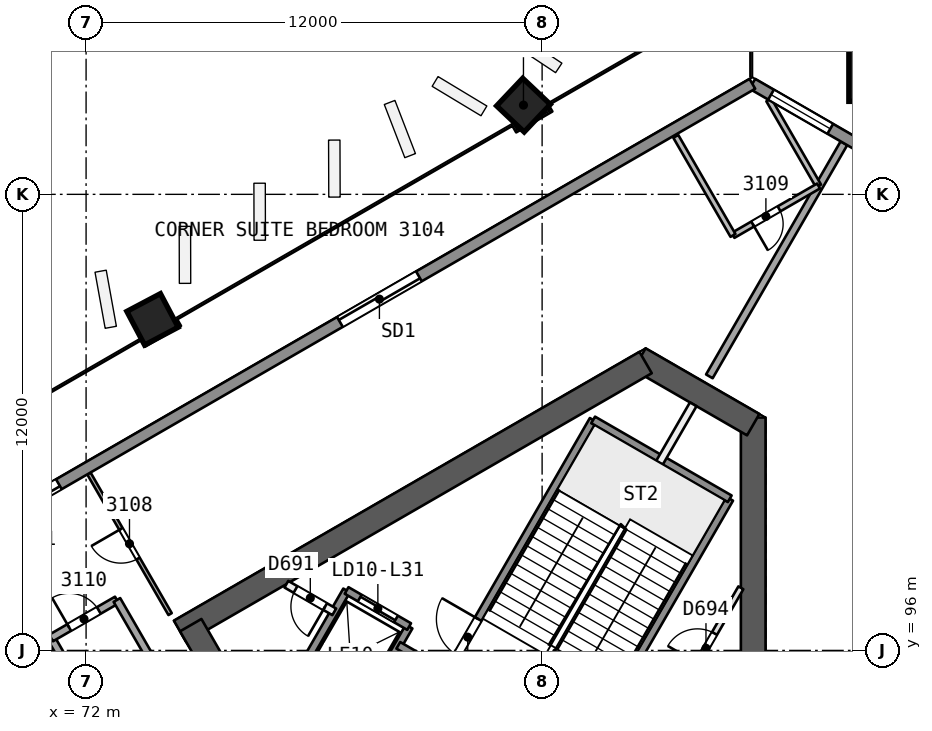
"""IFC4 building model, lengths in metres.
Left out: names, types, materials, properties, quantities, classifications, styles, units other than length and angle.
Written with IfcOpenShell. Run it as: python <this file> out.ifc"""

import sys

from ifc_helpers import new_model, si_unit, direction, frame, frame_2d, origin, origin_2d, place, context, subcontext, project, spatial, rectangle, extrude, element, fill, save


model = new_model("IFC4")
c1 = context("Model", 3, precision=1e-05, world=origin(), true_north=direction((0.0, 1.0)))
c2 = subcontext(c1, "Body", "Model", "MODEL_VIEW")
j1 = project(units=[si_unit("LENGTHUNIT", "METRE"), si_unit("PLANEANGLEUNIT", "RADIAN")], contexts=[c1])
p1 = place(None, origin())
s1 = spatial("IfcSite", under=j1, at=p1, CompositionType="ELEMENT")
p2 = place(p1, origin())
s2 = spatial("IfcBuilding", under=s1, at=p2, CompositionType="ELEMENT")
p3 = place(p2, frame((0.0, 0.0, 129.0)))
s3 = spatial("IfcBuildingStorey", under=s2, at=p3, CompositionType="ELEMENT", Elevation=129.0)
p4 = place(p3, frame((89.555, 88.119, 0.0), z_axis=(0.0, 0.0, 1.0), x_axis=(0.0, 1.0, 0.0)))
e1 = element("IfcWall", 1, at=p4, inside=s3, PredefinedType="SHEAR", context=c2, shape_type="SweptSolid", body=[
    extrude(rectangle(XDim=14.009, YDim=0.65, at=frame_2d((7.004, 0.0))), origin(), (0.0, 0.0, 1.0), 3.7),
])
p5 = place(p3, frame((89.555, 101.94, 0.0), z_axis=(0.0, 0.0, 1.0), x_axis=(-0.866031550877, 0.499989352773, 0.0)))
e2 = element("IfcWall", 2, at=p5, inside=s3, PredefinedType="SHEAR", context=c2, shape_type="SweptSolid", body=[
    extrude(rectangle(XDim=3.458, YDim=0.65, at=frame_2d((1.729, 0.0))), origin(), (0.0, 0.0, 1.0), 3.7),
])
p6 = place(p3, frame((86.723, 103.575, 0.0), z_axis=(0.0, 0.0, 1.0), x_axis=(-0.866031824457, -0.499988878904, 0.0)))
e3 = element("IfcWall", 3, at=p6, inside=s3, PredefinedType="SHEAR", context=c2, shape_type="SweptSolid", body=[
    extrude(rectangle(XDim=14.146, YDim=0.65, at=frame_2d((7.073, 0.0))), origin(), (0.0, 0.0, 1.0), 3.7),
])
p7 = place(p3, frame((74.754, 96.665, 0.0), z_axis=(0.0, 0.0, 1.0), x_axis=(0.500011799426, -0.866018591275, 0.0)))
e4 = element("IfcWall", 4, at=p7, inside=s3, PredefinedType="SHEAR", context=c2, shape_type="SweptSolid", body=[
    extrude(rectangle(XDim=10.055, YDim=0.65, at=frame_2d((5.027, 0.0))), origin(), (0.0, 0.0, 1.0), 3.7),
])
p8 = place(p7, frame((7.905, 0.0, 0.0)))
e5 = element("IfcOpeningElement", 5, at=p8, cuts=e4, PredefinedType="OPENING", context=c2, shape_type="SweptSolid", body=[
    extrude(rectangle(XDim=1.2, YDim=2.1, at=frame_2d((0.6, 1.05))), frame((0.0, 0.335, 0.0), z_axis=(0.0, -1.0, 0.0), x_axis=(1.0, 0.0, 0.0)), (0.0, 0.0, 1.0), 0.671),
])
p9 = place(p3, frame((93.292, 111.682, 0.0), z_axis=(-0.017607037296, -0.030466109479, 0.999380712447), x_axis=(0.865812389079, -0.500368770925, 1.01334e-07)))
e6 = element("IfcColumn", 6, at=p9, inside=s3, PredefinedType="COLUMN", context=c2, shape_type="SweptSolid", body=[
    extrude(rectangle(XDim=2.4, YDim=2.4, at=origin_2d()), origin(), (0.0, 0.0, 1.0), 3.702),
])
p10 = place(p3, frame((83.519, 110.381, 0.0), z_axis=(-0.008376454378, -0.028163354484, 0.999568237028), x_axis=(0.865853490665, 0.499842344986, 0.021339232902)))
e7 = element("IfcColumn", 7, at=p10, inside=s3, PredefinedType="COLUMN", context=c2, shape_type="SweptSolid", body=[
    extrude(rectangle(XDim=1.0, YDim=1.0, at=origin_2d()), origin(), (0.0, 0.0, 1.0), 3.702),
])
p11 = place(p3, frame((73.747, 104.739, 0.0), z_axis=(0.000857580205, -0.022758859284, 0.9997406158), x_axis=(0.865999914472, 0.499930977311, 0.010637953697)))
e8 = element("IfcColumn", 8, at=p11, inside=s3, PredefinedType="COLUMN", context=c2, shape_type="SweptSolid", body=[
    extrude(rectangle(XDim=1.0, YDim=1.0, at=origin_2d()), origin(), (0.0, 0.0, 1.0), 3.701),
])
p12 = place(p3, frame((91.942, 109.345, 0.0), z_axis=(0.0, 0.0, 1.0), x_axis=(-0.499980071345, -0.866036909293, 0.0)))
e9 = element("IfcWall", 9, at=p12, inside=s3, PredefinedType="PARTITIONING", context=c2, shape_type="SweptSolid", body=[
    extrude(rectangle(XDim=7.082, YDim=0.2, at=frame_2d((3.541, 0.0))), origin(), (0.0, 0.0, 1.0), 3.25),
])
p13 = place(p3, frame((74.21, 96.956, 0.0), z_axis=(0.0, 0.0, 1.0), x_axis=(-0.49995489152, 0.866051445611, 0.0)))
e10 = element("IfcWall", 10, at=p13, inside=s3, PredefinedType="PARTITIONING", context=c2, shape_type="SweptSolid", body=[
    extrude(rectangle(XDim=4.273, YDim=0.1, at=frame_2d((2.137, 0.0))), origin(), (0.0, 0.0, 1.0), 3.25),
])
p14 = place(p13, frame((1.687, 0.0, 0.0)))
e11 = element("IfcOpeningElement", 11, at=p14, cuts=e10, PredefinedType="OPENING", context=c2, shape_type="SweptSolid", body=[
    extrude(rectangle(XDim=0.9, YDim=2.1, at=frame_2d((0.45, 1.05))), frame((0.0, 0.061, 0.0), z_axis=(0.0, -1.0, 0.0), x_axis=(1.0, 0.0, 0.0)), (0.0, 0.0, 1.0), 0.121),
])
p15 = place(p3, frame((75.579, 88.533, 0.0), z_axis=(0.0, 0.0, 1.0), x_axis=(-0.5000018851, 0.866024315419, 0.0)))
e12 = element("IfcWall", 12, at=p15, inside=s3, PredefinedType="PARTITIONING", context=c2, shape_type="SweptSolid", body=[
    extrude(rectangle(XDim=9.0, YDim=0.2, at=frame_2d((4.5, 0.0))), origin(), (0.0, 0.0, 1.0), 3.25),
])
p16 = place(p3, frame((71.079, 96.327, 0.0), z_axis=(0.0, 0.0, 1.0), x_axis=(0.866041268327, 0.499972520799, 0.0)))
e13 = element("IfcWall", 13, at=p16, inside=s3, PredefinedType="PARTITIONING", context=c2, shape_type="SweptSolid", body=[
    extrude(rectangle(XDim=2.0, YDim=0.2, at=frame_2d((1.0, 0.0))), origin(), (0.0, 0.0, 1.0), 3.25),
])
p17 = place(p16, frame((0.55, 0.0, 0.0)))
e14 = element("IfcOpeningElement", 14, at=p17, cuts=e13, PredefinedType="OPENING", context=c2, shape_type="SweptSolid", body=[
    extrude(rectangle(XDim=0.9, YDim=2.1, at=frame_2d((0.45, 1.05))), frame((0.0, 0.11, 0.0), z_axis=(0.0, -1.0, 0.0), x_axis=(1.0, 0.0, 0.0)), (0.0, 0.0, 1.0), 0.221),
])
p18 = place(p3, frame((72.811, 97.327, 0.0), z_axis=(0.0, 0.0, 1.0), x_axis=(0.5000018851, -0.866024315419, 0.0)))
e15 = element("IfcWall", 15, at=p18, inside=s3, PredefinedType="PARTITIONING", context=c2, shape_type="SweptSolid", body=[
    extrude(rectangle(XDim=9.0, YDim=0.2, at=frame_2d((4.5, 0.0))), origin(), (0.0, 0.0, 1.0), 3.25),
])
p19 = place(p3, frame((68.564, 98.63, 0.0), z_axis=(0.0, 0.0, 1.0), x_axis=(0.499988083099, -0.866032283901, 0.0)))
e16 = element("IfcWall", 16, at=p19, inside=s3, PredefinedType="PARTITIONING", context=c2, shape_type="SweptSolid", body=[
    extrude(rectangle(XDim=12.252, YDim=0.2, at=frame_2d((6.126, 0.0))), origin(), (0.0, 0.0, 1.0), 3.25),
])
p20 = place(p3, frame((89.966, 110.486, 0.0), z_axis=(0.0, 0.0, 1.0), x_axis=(0.500032006216, -0.866006924198, 0.0)))
e17 = element("IfcWall", 17, at=p20, inside=s3, PredefinedType="PARTITIONING", context=c2, shape_type="SweptSolid", body=[
    extrude(rectangle(XDim=2.617, YDim=0.15, at=frame_2d((1.309, 0.0))), origin(), (0.0, 0.0, 1.0), 3.25),
])
p21 = place(p3, frame((91.274, 108.219, 0.0), z_axis=(0.0, 0.0, 1.0), x_axis=(-0.866021400173, -0.500006934395, 0.0)))
e18 = element("IfcWall", 18, at=p21, inside=s3, PredefinedType="PARTITIONING", context=c2, shape_type="SweptSolid", body=[
    extrude(rectangle(XDim=2.6, YDim=0.15, at=frame_2d((1.3, 0.0))), origin(), (0.0, 0.0, 1.0), 3.25),
])
p22 = place(p21, frame((1.2, 0.0, 0.0)))
e19 = element("IfcOpeningElement", 19, at=p22, cuts=e18, PredefinedType="OPENING", context=c2, shape_type="SweptSolid", body=[
    extrude(rectangle(XDim=0.8, YDim=2.1, at=frame_2d((0.4, 1.05))), frame((0.0, 0.085, 0.0), z_axis=(0.0, -1.0, 0.0), x_axis=(1.0, 0.0, 0.0)), (0.0, 0.0, 1.0), 0.171),
])
p23 = place(p3, frame((89.023, 106.919, 0.0), z_axis=(0.0, 0.0, 1.0), x_axis=(-0.500012686397, 0.866018079166, 0.0)))
e20 = element("IfcWall", 20, at=p23, inside=s3, PredefinedType="PARTITIONING", context=c2, shape_type="SweptSolid", body=[
    extrude(rectangle(XDim=3.01, YDim=0.15, at=frame_2d((1.505, 0.0))), origin(), (0.0, 0.0, 1.0), 3.25),
])
p24 = place(p3, frame((89.532, 110.908, 0.0), z_axis=(0.0, 0.0, 1.0), x_axis=(0.866021903596, -0.500006062455, 0.0)))
e21 = element("IfcWall", 21, at=p24, inside=s3, PredefinedType="SOLIDWALL", context=c2, shape_type="SweptSolid", body=[
    extrude(rectangle(XDim=5.738, YDim=0.3, at=frame_2d((2.869, 0.0))), origin(), (0.0, 0.0, 1.0), 3.25),
])
p25 = place(p24, frame((0.568, 0.0, 0.9)))
e22 = element("IfcOpeningElement", 22, at=p25, cuts=e21, PredefinedType="OPENING", context=c2, shape_type="SweptSolid", body=[
    extrude(rectangle(XDim=1.8, YDim=1.5, at=frame_2d((0.9, 0.75))), frame((0.0, 0.161, 0.0), z_axis=(0.0, -1.0, 0.0), x_axis=(1.0, 0.0, 0.0)), (0.0, 0.0, 1.0), 0.321),
])
p26 = place(p24, frame((3.446, 0.0, 0.9)))
e23 = element("IfcOpeningElement", 23, at=p26, cuts=e21, PredefinedType="OPENING", context=c2, shape_type="SweptSolid", body=[
    extrude(rectangle(XDim=1.8, YDim=1.5, at=frame_2d((0.9, 0.75))), frame((0.0, 0.161, 0.0), z_axis=(0.0, -1.0, 0.0), x_axis=(1.0, 0.0, 0.0)), (0.0, 0.0, 1.0), 0.321),
])
p27 = place(p3, frame((40.967, 82.869, 0.0), z_axis=(0.0, 0.0, 1.0), x_axis=(0.86602616217, 0.499998686435, 0.0)))
e24 = element("IfcWall", 24, at=p27, inside=s3, PredefinedType="SOLIDWALL", context=c2, shape_type="SweptSolid", body=[
    extrude(rectangle(XDim=56.079, YDim=0.3, at=frame_2d((28.04, 0.0))), origin(), (0.0, 0.0, 1.0), 3.25),
])
p28 = place(p27, frame((26.839, 0.0, 0.0)))
e25 = element("IfcOpeningElement", 25, at=p28, cuts=e24, PredefinedType="OPENING", context=c2, shape_type="SweptSolid", body=[
    extrude(rectangle(XDim=2.4, YDim=2.4, at=frame_2d((1.2, 1.2))), frame((0.0, 0.161, 0.0), z_axis=(0.0, -1.0, 0.0), x_axis=(1.0, 0.0, 0.0)), (0.0, 0.0, 1.0), 0.321),
])
p29 = place(p27, frame((32.607, 0.0, 0.0)))
e26 = element("IfcOpeningElement", 26, at=p29, cuts=e24, PredefinedType="OPENING", context=c2, shape_type="SweptSolid", body=[
    extrude(rectangle(XDim=2.4, YDim=2.4, at=frame_2d((1.2, 1.2))), frame((0.0, 0.161, 0.0), z_axis=(0.0, -1.0, 0.0), x_axis=(1.0, 0.0, 0.0)), (0.0, 0.0, 1.0), 0.321),
])
p30 = place(p27, frame((43.547, 0.0, 0.0)))
e27 = element("IfcOpeningElement", 27, at=p30, cuts=e24, PredefinedType="OPENING", context=c2, shape_type="SweptSolid", body=[
    extrude(rectangle(XDim=2.4, YDim=2.4, at=frame_2d((1.2, 1.2))), frame((0.0, 0.161, 0.0), z_axis=(0.0, -1.0, 0.0), x_axis=(1.0, 0.0, 0.0)), (0.0, 0.0, 1.0), 0.321),
])
p31 = place(p27, frame((21.072, 0.0, 0.0)))
e28 = element("IfcOpeningElement", 28, at=p31, cuts=e24, PredefinedType="OPENING", context=c2, shape_type="SweptSolid", body=[
    extrude(rectangle(XDim=2.4, YDim=2.4, at=frame_2d((1.2, 1.2))), frame((0.0, 0.161, 0.0), z_axis=(0.0, -1.0, 0.0), x_axis=(1.0, 0.0, 0.0)), (0.0, 0.0, 1.0), 0.321),
])
p32 = place(p27, frame((10.136, 0.0, 0.0)))
e29 = element("IfcOpeningElement", 29, at=p32, cuts=e24, PredefinedType="OPENING", context=c2, shape_type="SweptSolid", body=[
    extrude(rectangle(XDim=2.4, YDim=2.4, at=frame_2d((1.2, 1.2))), frame((0.0, 0.161, 0.0), z_axis=(0.0, -1.0, 0.0), x_axis=(1.0, 0.0, 0.0)), (0.0, 0.0, 1.0), 0.321),
])
p33 = place(p3, frame((87.421, 94.514, 0.0), z_axis=(0.0, 0.0, 1.0), x_axis=(0.499993116331, 0.866029378036, 0.0)))
e30 = element("IfcWall", 30, at=p33, inside=s3, PredefinedType="PARTITIONING", context=c2, shape_type="SweptSolid", body=[
    extrude(rectangle(XDim=3.618, YDim=0.15, at=frame_2d((1.809, 0.0))), origin(), (0.0, 0.0, 1.0), 3.25),
])
p34 = place(p33, frame((1.332, 0.0, 0.0)))
e31 = element("IfcOpeningElement", 31, at=p34, cuts=e30, PredefinedType="OPENING", context=c2, shape_type="SweptSolid", body=[
    extrude(rectangle(XDim=0.9, YDim=2.1, at=frame_2d((0.45, 1.05))), frame((0.0, 0.085, 0.0), z_axis=(0.0, -1.0, 0.0), x_axis=(1.0, 0.0, 0.0)), (0.0, 0.0, 1.0), 0.171),
])
p35 = place(p3, frame((85.087, 93.321, 0.0), z_axis=(0.0, 0.0, 1.0), x_axis=(0.500019787375, 0.866013979237, 0.0)))
e32 = element("IfcWall", 32, at=p35, inside=s3, PredefinedType="SOLIDWALL", context=c2, shape_type="SweptSolid", body=[
    extrude(rectangle(XDim=7.7, YDim=0.2, at=frame_2d((3.85, 0.0))), origin(), (0.0, 0.0, 1.0), 3.25),
])
p36 = place(p3, frame((87.09, 100.94, 0.0), z_axis=(0.0, 0.0, 1.0), x_axis=(0.499944938281, 0.866057191349, 0.0)))
e33 = element("IfcWall", 33, at=p36, inside=s3, PredefinedType="PARTITIONING", context=c2, shape_type="SweptSolid", body=[
    extrude(rectangle(XDim=1.773, YDim=0.2, at=frame_2d((0.887, 0.0))), origin(), (0.0, 0.0, 1.0), 3.25),
])
p37 = place(p3, frame((81.493, 95.396, 0.0), z_axis=(0.0, 0.0, 1.0), x_axis=(0.500006057782, 0.866021906294, 0.0)))
e34 = element("IfcWall", 34, at=p37, inside=s3, PredefinedType="SOLIDWALL", context=c2, shape_type="SweptSolid", body=[
    extrude(rectangle(XDim=7.7, YDim=0.2, at=frame_2d((3.85, 0.0))), origin(), (0.0, 0.0, 1.0), 3.25),
])
p38 = place(p37, frame((0.55, 0.0, 0.0)))
e35 = element("IfcOpeningElement", 35, at=p38, cuts=e34, PredefinedType="OPENING", context=c2, shape_type="SweptSolid", body=[
    extrude(rectangle(XDim=1.1, YDim=2.1, at=frame_2d((0.55, 1.05))), frame((0.0, 0.11, 0.0), z_axis=(0.0, -1.0, 0.0), x_axis=(1.0, 0.0, 0.0)), (0.0, 0.0, 1.0), 0.221),
])
for number, where, z_axis, x_axis in (
    (36, (78.976, 93.986, 0.0), (0.0, 0.0, 1.0), (0.5, 0.866, 0.0)),
    (37, (77.33, 94.936, 0.0), (0.0, 0.0, 1.0), (0.5, 0.866, 0.0)),
):
    element("IfcWall", number, at=place(p3, frame(where, z_axis=z_axis, x_axis=x_axis)), inside=s3, PredefinedType="SOLIDWALL", context=c2, shape_type="SweptSolid", body=[
        extrude(rectangle(XDim=3.05, YDim=0.2, at=frame_2d((1.525, 0.0))), origin(), (0.0, 0.0, 1.0), 3.25),
    ])
p39 = place(p3, frame((78.53, 97.014, 0.0), z_axis=(0.0, 0.0, 1.0), x_axis=(-0.866045896294, 0.499964504253, 0.0)))
e38 = element("IfcWall", 38, at=p39, inside=s3, PredefinedType="PARTITIONING", context=c2, shape_type="SweptSolid", body=[
    extrude(rectangle(XDim=1.455, YDim=0.2, at=frame_2d((0.728, 0.0))), origin(), (0.0, 0.0, 1.0), 3.25),
])
p40 = place(p39, frame((0.278, 0.0, 0.0)))
e39 = element("IfcOpeningElement", 39, at=p40, cuts=e38, PredefinedType="OPENING", context=c2, shape_type="SweptSolid", body=[
    extrude(rectangle(XDim=0.9, YDim=2.1, at=frame_2d((0.45, 1.05))), frame((0.0, 0.11, 0.0), z_axis=(0.0, -1.0, 0.0), x_axis=(1.0, 0.0, 0.0)), (0.0, 0.0, 1.0), 0.221),
])
p41 = place(p3, frame((88.01, 91.634, 0.0), z_axis=(0.0, 0.0, 1.0), x_axis=(-0.866024315419, 0.5000018851, 0.0)))
e40 = element("IfcWall", 40, at=p41, inside=s3, PredefinedType="SOLIDWALL", context=c2, shape_type="SweptSolid", body=[
    extrude(rectangle(XDim=9.0, YDim=0.2, at=frame_2d((4.5, 0.0))), origin(), (0.0, 0.0, 1.0), 3.25),
])
p42 = place(p3, frame((80.5, 96.627, 0.0), z_axis=(0.0, 0.0, 1.0), x_axis=(-0.86601224135, 0.500022797313, 0.0)))
e41 = element("IfcWall", 41, at=p42, inside=s3, PredefinedType="SOLIDWALL", context=c2, shape_type="SweptSolid", body=[
    extrude(rectangle(XDim=1.9, YDim=0.2, at=frame_2d((0.95, 0.0))), origin(), (0.0, 0.0, 1.0), 3.25),
])
p43 = place(p42, frame((0.4, 0.0, 0.0)))
e42 = element("IfcOpeningElement", 42, at=p43, cuts=e41, PredefinedType="OPENING", context=c2, shape_type="SweptSolid", body=[
    extrude(rectangle(XDim=1.1, YDim=2.1, at=frame_2d((0.55, 1.05))), frame((0.0, 0.11, 0.0), z_axis=(0.0, -1.0, 0.0), x_axis=(1.0, 0.0, 0.0)), (0.0, 0.0, 1.0), 0.221),
])
p44 = place(p3, frame((88.937, 99.99, 0.0), z_axis=(0.0, 0.0, 1.0), x_axis=(-0.866004344652, 0.500036473714, 0.0)))
e43 = element("IfcWall", 43, at=p44, inside=s3, PredefinedType="SOLIDWALL", context=c2, shape_type="SweptSolid", body=[
    extrude(rectangle(XDim=4.15, YDim=0.2, at=frame_2d((2.075, 0.0))), origin(), (0.0, 0.0, 1.0), 3.25),
])
p45 = place(p14, origin())
e44 = element("IfcDoor", 44, at=p45, inside=s3, OperationType="SINGLE_SWING_RIGHT", PredefinedType="NOTDEFINED", context=c2, shape_type="SweptSolid", body=[
    extrude(rectangle(XDim=0.9, YDim=2.1, at=frame_2d((0.45, 1.05))), frame((0.0, 0.025, 0.0), z_axis=(0.0, -1.0, 0.0), x_axis=(1.0, 0.0, 0.0)), (0.0, 0.0, 1.0), 0.05),
])
fill(e11, e44)
p46 = place(p22, origin())
e45 = element("IfcDoor", 45, at=p46, inside=s3, OperationType="SINGLE_SWING_RIGHT", PredefinedType="NOTDEFINED", context=c2, shape_type="SweptSolid", body=[
    extrude(rectangle(XDim=0.8, YDim=2.1, at=frame_2d((0.4, 1.05))), frame((0.0, 0.025, 0.0), z_axis=(0.0, -1.0, 0.0), x_axis=(1.0, 0.0, 0.0)), (0.0, 0.0, 1.0), 0.05),
])
fill(e19, e45)
p47 = place(p17, origin())
e46 = element("IfcDoor", 46, at=p47, inside=s3, OperationType="SINGLE_SWING_LEFT", PredefinedType="NOTDEFINED", context=c2, shape_type="SweptSolid", body=[
    extrude(rectangle(XDim=0.9, YDim=2.1, at=frame_2d((0.45, 1.05))), frame((0.0, 0.025, 0.0), z_axis=(0.0, -1.0, 0.0), x_axis=(1.0, 0.0, 0.0)), (0.0, 0.0, 1.0), 0.05),
])
fill(e14, e46)
p48 = place(p25, origin())
e47 = element("IfcWindow", 47, at=p48, inside=s3, PartitioningType="SINGLE_PANEL", PredefinedType="WINDOW", context=c2, shape_type="SweptSolid", body=[
    extrude(rectangle(XDim=1.8, YDim=1.5, at=frame_2d((0.9, 0.75))), frame((0.0, 0.03, 0.0), z_axis=(0.0, -1.0, 0.0), x_axis=(1.0, 0.0, 0.0)), (0.0, 0.0, 1.0), 0.06),
])
fill(e22, e47)
p49 = place(p29, origin())
e48 = element("IfcDoor", 48, at=p49, inside=s3, OperationType="SLIDING_TO_RIGHT", PredefinedType="NOTDEFINED", context=c2, shape_type="SweptSolid", body=[
    extrude(rectangle(XDim=2.4, YDim=2.4, at=frame_2d((1.2, 1.2))), frame((0.0, 0.025, 0.0), z_axis=(0.0, -1.0, 0.0), x_axis=(1.0, 0.0, 0.0)), (0.0, 0.0, 1.0), 0.05),
])
fill(e26, e48)
p50 = place(p30, origin())
e49 = element("IfcDoor", 49, at=p50, inside=s3, OperationType="SLIDING_TO_LEFT", PredefinedType="NOTDEFINED", context=c2, shape_type="SweptSolid", body=[
    extrude(rectangle(XDim=2.4, YDim=2.4, at=frame_2d((1.2, 1.2))), frame((0.0, 0.025, 0.0), z_axis=(0.0, -1.0, 0.0), x_axis=(1.0, 0.0, 0.0)), (0.0, 0.0, 1.0), 0.05),
])
fill(e27, e49)
p51 = place(p43, origin())
e50 = element("IfcDoor", 50, at=p51, inside=s3, OperationType="SLIDING_TO_RIGHT", PredefinedType="NOTDEFINED", context=c2, shape_type="SweptSolid", body=[
    extrude(rectangle(XDim=1.1, YDim=2.1, at=frame_2d((0.55, 1.05))), frame((0.0, 0.025, 0.0), z_axis=(0.0, -1.0, 0.0), x_axis=(1.0, 0.0, 0.0)), (0.0, 0.0, 1.0), 0.05),
])
fill(e42, e50)
p52 = place(p40, origin())
e51 = element("IfcDoor", 51, at=p52, inside=s3, OperationType="SINGLE_SWING_LEFT", PredefinedType="NOTDEFINED", context=c2, shape_type="SweptSolid", body=[
    extrude(rectangle(XDim=0.9, YDim=2.1, at=frame_2d((0.45, 1.05))), frame((0.0, 0.025, 0.0), z_axis=(0.0, -1.0, 0.0), x_axis=(1.0, 0.0, 0.0)), (0.0, 0.0, 1.0), 0.05),
])
fill(e39, e51)
p53 = place(p38, origin())
e52 = element("IfcDoor", 52, at=p53, inside=s3, OperationType="SINGLE_SWING_RIGHT", PredefinedType="NOTDEFINED", context=c2, shape_type="SweptSolid", body=[
    extrude(rectangle(XDim=1.1, YDim=2.1, at=frame_2d((0.55, 1.05))), frame((0.0, 0.025, 0.0), z_axis=(0.0, -1.0, 0.0), x_axis=(1.0, 0.0, 0.0)), (0.0, 0.0, 1.0), 0.05),
])
fill(e35, e52)
p54 = place(p34, origin())
e53 = element("IfcDoor", 53, at=p54, inside=s3, OperationType="SINGLE_SWING_LEFT", PredefinedType="NOTDEFINED", context=c2, shape_type="SweptSolid", body=[
    extrude(rectangle(XDim=0.9, YDim=2.1, at=frame_2d((0.45, 1.05))), frame((0.0, 0.025, 0.0), z_axis=(0.0, -1.0, 0.0), x_axis=(1.0, 0.0, 0.0)), (0.0, 0.0, 1.0), 0.05),
])
fill(e31, e53)
save(model, sys.argv[1])
